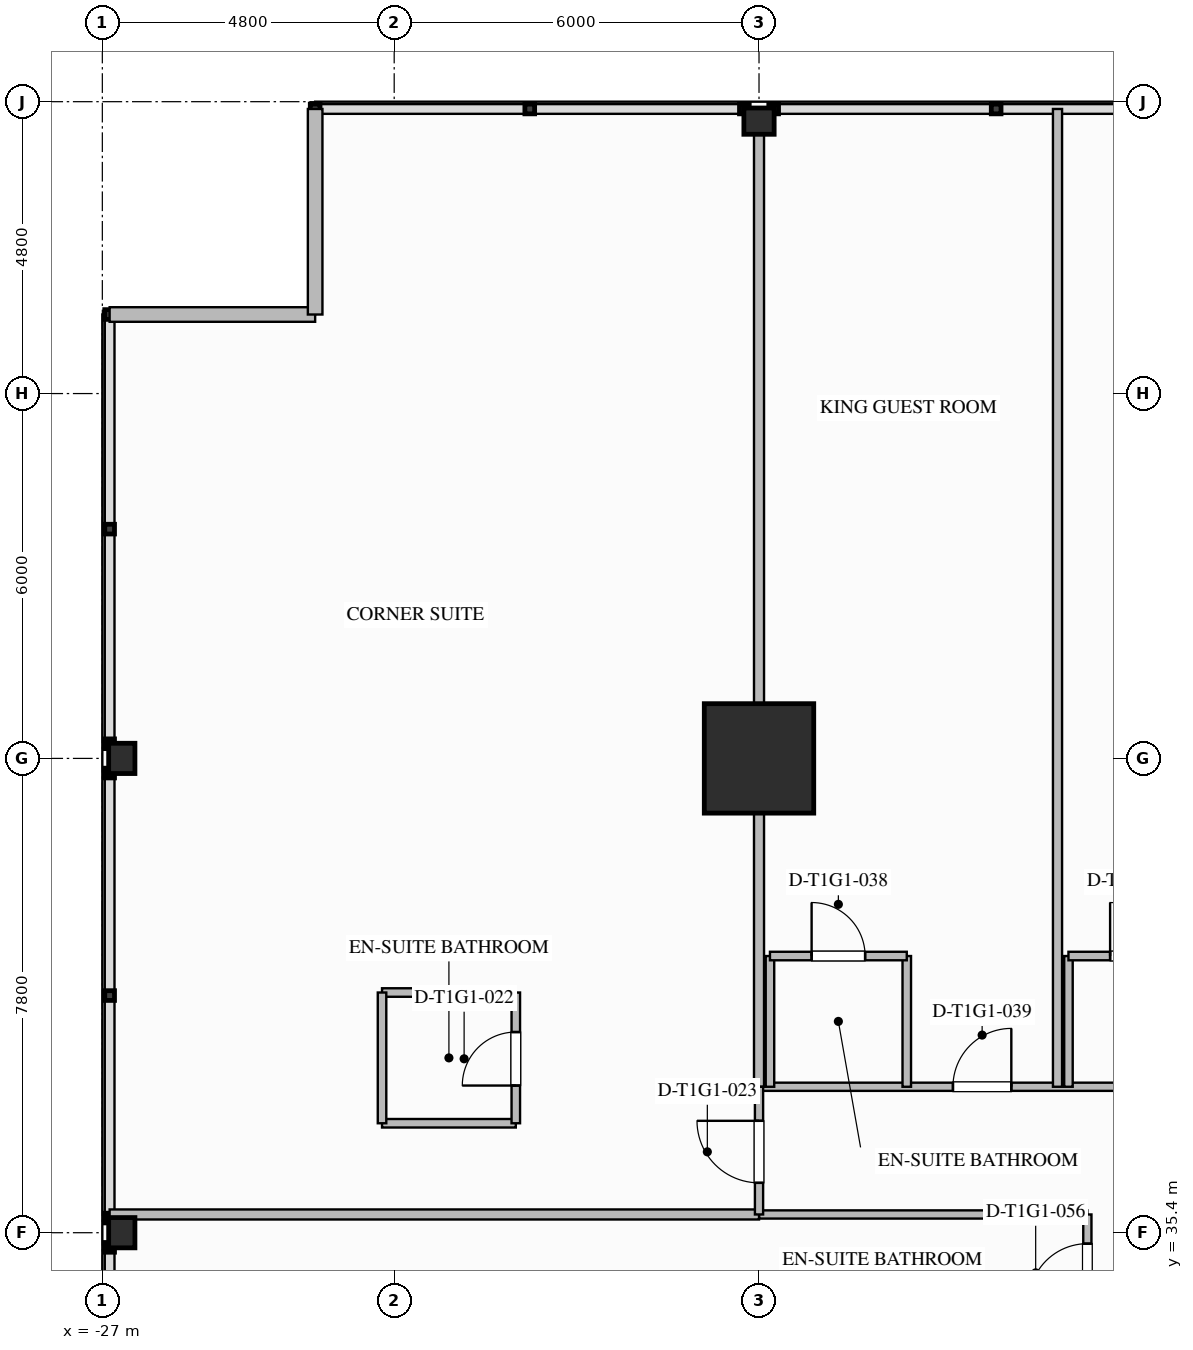
"""IFC4 building model, lengths in metres.
Left out: names, types, materials, properties, quantities, classifications, styles, units other than length and angle.
Written with IfcOpenShell. Run it as: python <this file> out.ifc"""

import sys

from ifc_helpers import new_model, si_unit, direction, frame, frame_2d, origin, origin_2d, place, context, subcontext, project, spatial, rectangle, i_section, extrude, element, fill, save


model = new_model("IFC4")
c1 = context("Model", 3, precision=1e-05, world=origin(), true_north=direction((0.0, 1.0)))
c2 = subcontext(c1, "Body", "Model", "MODEL_VIEW")
j1 = project(units=[si_unit("LENGTHUNIT", "METRE"), si_unit("PLANEANGLEUNIT", "RADIAN")], contexts=[c1])
p1 = place(None, origin())
s1 = spatial("IfcSite", under=j1, at=p1, CompositionType="ELEMENT")
p2 = place(p1, origin())
s2 = spatial("IfcBuilding", under=s1, at=p2, CompositionType="ELEMENT")
p3 = place(p2, frame((0.0, 0.0, 33.2)))
s3 = spatial("IfcBuildingStorey", under=s2, at=p3, CompositionType="ELEMENT", Elevation=33.2)
p4 = place(p3, frame((-16.2, 43.2, 0.0), z_axis=(0.0, 0.0, 1.0), x_axis=(1.0, 0.0, 0.0)))
e1 = element("IfcColumn", 1, at=p4, inside=s3, PredefinedType="COLUMN", context=c2, shape_type="SweptSolid", body=[
    extrude(rectangle(XDim=1.8, YDim=1.8, at=origin_2d()), origin(), (0.0, 0.0, 1.0), 3.5),
])
for number, where, z_axis, x_axis in (
    (2, (-26.68, 35.4, -0.26), (0.0, 0.0, 1.0), (1.0, 0.0, 0.0)),
    (3, (-26.68, 43.2, -0.26), (0.0, 0.0, 1.0), (1.0, 0.0, 0.0)),
    (4, (-16.2, 53.68, -0.26), (0.0, 0.0, 1.0), (0.0, 1.0, 0.0)),
):
    element("IfcColumn", number, at=place(p3, frame(where, z_axis=z_axis, x_axis=x_axis)), inside=s3, PredefinedType="COLUMN", context=c2, shape_type="SweptSolid", body=[
        extrude(i_section(OverallWidth=0.432, OverallDepth=0.498, WebThickness=0.056, FlangeThickness=0.089, FilletRadius=0.03, at=origin_2d()), origin(), (0.0, 0.0, 1.0), 3.757),
    ])
for number, where, z_axis, x_axis in (
    (5, (-26.88, 50.5, 0.0), (0.0, 0.0, 1.0), (1.0, 0.0, 0.0)),
    (6, (-23.5, 50.5, 0.0), (0.0, 0.0, 1.0), (0.0, 1.0, 0.0)),
):
    element("IfcWall", number, at=place(p3, frame(where, z_axis=z_axis, x_axis=x_axis)), inside=s3, PredefinedType="STANDARD", context=c2, shape_type="SweptSolid", body=[
        extrude(rectangle(XDim=3.38, YDim=0.24, at=frame_2d((1.69, 0.0))), origin(), (0.0, 0.0, 1.0), 3.24),
    ])
p5 = place(p3, frame((-16.2, 37.8, 0.0), z_axis=(0.0, 0.0, 1.0), x_axis=(1.0, 0.0, 0.0)))
e7 = element("IfcWall", 7, at=p5, inside=s3, PredefinedType="PARTITIONING", context=c2, shape_type="SweptSolid", body=[
    extrude(rectangle(XDim=32.4, YDim=0.135, at=frame_2d((16.2, 0.0))), origin(), (0.0, 0.0, 1.0), 3.24),
])
p6 = place(p5, frame((3.189, 0.0, 0.0)))
e8 = element("IfcOpeningElement", 8, at=p6, cuts=e7, PredefinedType="OPENING", context=c2, shape_type="SweptSolid", body=[
    extrude(rectangle(XDim=0.96, YDim=2.15, at=frame_2d((0.48, 1.075))), frame((0.0, 0.077, 0.0), z_axis=(0.0, -1.0, 0.0), x_axis=(1.0, 0.0, 0.0)), (0.0, 0.0, 1.0), 0.155),
])
p7 = place(p5, frame((8.229, 0.0, 0.0)))
e9 = element("IfcOpeningElement", 9, at=p7, cuts=e7, PredefinedType="OPENING", context=c2, shape_type="SweptSolid", body=[
    extrude(rectangle(XDim=1.26, YDim=2.2, at=frame_2d((0.63, 1.1))), frame((0.0, 0.077, 0.0), z_axis=(0.0, -1.0, 0.0), x_axis=(1.0, 0.0, 0.0)), (0.0, 0.0, 1.0), 0.155),
])
p8 = place(p5, frame((12.78, 0.0, 0.0)))
e10 = element("IfcOpeningElement", 10, at=p8, cuts=e7, PredefinedType="OPENING", context=c2, shape_type="SweptSolid", body=[
    extrude(rectangle(XDim=1.02, YDim=2.15, at=frame_2d((0.51, 1.075))), frame((0.0, 0.077, 0.0), z_axis=(0.0, -1.0, 0.0), x_axis=(1.0, 0.0, 0.0)), (0.0, 0.0, 1.0), 0.155),
])
p9 = place(p5, frame((19.425, 0.0, 0.0)))
e11 = element("IfcOpeningElement", 11, at=p9, cuts=e7, PredefinedType="OPENING", context=c2, shape_type="SweptSolid", body=[
    extrude(rectangle(XDim=0.96, YDim=2.15, at=frame_2d((0.48, 1.075))), frame((0.0, 0.077, 0.0), z_axis=(0.0, -1.0, 0.0), x_axis=(1.0, 0.0, 0.0)), (0.0, 0.0, 1.0), 0.155),
])
p10 = place(p5, frame((24.92, 0.0, 0.0)))
e12 = element("IfcOpeningElement", 12, at=p10, cuts=e7, PredefinedType="OPENING", context=c2, shape_type="SweptSolid", body=[
    extrude(rectangle(XDim=1.26, YDim=2.2, at=frame_2d((0.63, 1.1))), frame((0.0, 0.077, 0.0), z_axis=(0.0, -1.0, 0.0), x_axis=(1.0, 0.0, 0.0)), (0.0, 0.0, 1.0), 0.155),
])
p11 = place(p5, frame((30.68, 0.0, 0.0)))
e13 = element("IfcOpeningElement", 13, at=p11, cuts=e7, PredefinedType="OPENING", context=c2, shape_type="SweptSolid", body=[
    extrude(rectangle(XDim=0.96, YDim=2.15, at=frame_2d((0.48, 1.075))), frame((0.0, 0.077, 0.0), z_axis=(0.0, -1.0, 0.0), x_axis=(1.0, 0.0, 0.0)), (0.0, 0.0, 1.0), 0.155),
])
p12 = place(p3, frame((-16.2, 35.7, 0.0), z_axis=(0.0, 0.0, 1.0), x_axis=(1.0, 0.0, 0.0)))
e14 = element("IfcWall", 14, at=p12, inside=s3, PredefinedType="PARTITIONING", context=c2, shape_type="SweptSolid", body=[
    extrude(rectangle(XDim=5.4, YDim=0.135, at=frame_2d((2.7, 0.0))), origin(), (0.0, 0.0, 1.0), 3.24),
])
p13 = place(p3, frame((-10.8, 18.3, 0.0), z_axis=(0.0, 0.0, 1.0), x_axis=(0.0, 1.0, 0.0)))
e15 = element("IfcWall", 15, at=p13, inside=s3, PredefinedType="PARTITIONING", context=c2, shape_type="SweptSolid", body=[
    extrude(rectangle(XDim=17.4, YDim=0.135, at=frame_2d((8.7, 0.0))), origin(), (0.0, 0.0, 1.0), 3.24),
])
p14 = place(p13, frame((2.91, 0.0, 0.0)))
e16 = element("IfcOpeningElement", 16, at=p14, cuts=e15, PredefinedType="OPENING", context=c2, shape_type="SweptSolid", body=[
    extrude(rectangle(XDim=0.96, YDim=2.15, at=frame_2d((0.48, 1.075))), frame((0.0, 0.077, 0.0), z_axis=(0.0, -1.0, 0.0), x_axis=(1.0, 0.0, 0.0)), (0.0, 0.0, 1.0), 0.155),
])
p15 = place(p13, frame((7.26, 0.0, 0.0)))
e17 = element("IfcOpeningElement", 17, at=p15, cuts=e15, PredefinedType="OPENING", context=c2, shape_type="SweptSolid", body=[
    extrude(rectangle(XDim=0.96, YDim=2.15, at=frame_2d((0.48, 1.075))), frame((0.0, 0.077, 0.0), z_axis=(0.0, -1.0, 0.0), x_axis=(1.0, 0.0, 0.0)), (0.0, 0.0, 1.0), 0.155),
])
p16 = place(p13, frame((11.61, 0.0, 0.0)))
e18 = element("IfcOpeningElement", 18, at=p16, cuts=e15, PredefinedType="OPENING", context=c2, shape_type="SweptSolid", body=[
    extrude(rectangle(XDim=0.96, YDim=2.15, at=frame_2d((0.48, 1.075))), frame((0.0, 0.077, 0.0), z_axis=(0.0, -1.0, 0.0), x_axis=(1.0, 0.0, 0.0)), (0.0, 0.0, 1.0), 0.155),
])
p17 = place(p13, frame((15.96, 0.0, 0.0)))
e19 = element("IfcOpeningElement", 19, at=p17, cuts=e15, PredefinedType="OPENING", context=c2, shape_type="SweptSolid", body=[
    extrude(rectangle(XDim=0.96, YDim=2.15, at=frame_2d((0.48, 1.075))), frame((0.0, 0.077, 0.0), z_axis=(0.0, -1.0, 0.0), x_axis=(1.0, 0.0, 0.0)), (0.0, 0.0, 1.0), 0.155),
])
p18 = place(p3, frame((-16.2, 37.8, 0.0), z_axis=(0.0, 0.0, 1.0), x_axis=(0.0, 1.0, 0.0)))
e20 = element("IfcWall", 20, at=p18, inside=s3, PredefinedType="PARTITIONING", context=c2, shape_type="SweptSolid", body=[
    extrude(rectangle(XDim=16.08, YDim=0.165, at=frame_2d((8.04, 0.0))), origin(), (0.0, 0.0, 1.0), 2.298),
])
p19 = place(p3, frame((-26.88, 35.7, 0.0), z_axis=(0.0, 0.0, 1.0), x_axis=(1.0, 0.0, 0.0)))
e21 = element("IfcWall", 21, at=p19, inside=s3, PredefinedType="PARTITIONING", context=c2, shape_type="SweptSolid", body=[
    extrude(rectangle(XDim=10.68, YDim=0.165, at=frame_2d((5.34, 0.0))), origin(), (0.0, 0.0, 1.0), 2.298),
])
p20 = place(p3, frame((-16.2, 35.7, 0.0), z_axis=(0.0, 0.0, 1.0), x_axis=(0.0, 1.0, 0.0)))
e22 = element("IfcWall", 22, at=p20, inside=s3, PredefinedType="PARTITIONING", context=c2, shape_type="SweptSolid", body=[
    extrude(rectangle(XDim=2.1, YDim=0.135, at=frame_2d((1.05, 0.0))), origin(), (0.0, 0.0, 1.0), 2.298),
])
p21 = place(p20, frame((0.52, 0.0, 0.0)))
e23 = element("IfcOpeningElement", 23, at=p21, cuts=e22, PredefinedType="OPENING", context=c2, shape_type="SweptSolid", body=[
    extrude(rectangle(XDim=1.02, YDim=2.15, at=frame_2d((0.51, 1.075))), frame((0.0, 0.077, 0.0), z_axis=(0.0, -1.0, 0.0), x_axis=(1.0, 0.0, 0.0)), (0.0, 0.0, 1.0), 0.155),
])
for number, where, z_axis, x_axis in (
    (24, (-22.4, 37.2, 0.0), (0.0, 0.0, 1.0), (1.0, 0.0, 0.0)),
    (25, (-22.4, 39.35, 0.0), (0.0, 0.0, 1.0), (1.0, 0.0, 0.0)),
):
    element("IfcWall", number, at=place(p3, frame(where, z_axis=z_axis, x_axis=x_axis)), inside=s3, PredefinedType="PLUMBINGWALL", context=c2, shape_type="SweptSolid", body=[
        extrude(rectangle(XDim=2.2, YDim=0.14, at=frame_2d((1.1, 0.0))), origin(), (0.0, 0.0, 1.0), 3.24),
    ])
p22 = place(p3, frame((-22.4, 37.2, 0.0), z_axis=(0.0, 0.0, 1.0), x_axis=(0.0, 1.0, 0.0)))
e26 = element("IfcWall", 26, at=p22, inside=s3, PredefinedType="PLUMBINGWALL", context=c2, shape_type="SweptSolid", body=[
    extrude(rectangle(XDim=2.15, YDim=0.14, at=frame_2d((1.075, 0.0))), origin(), (0.0, 0.0, 1.0), 3.24),
])
p23 = place(p3, frame((-20.2, 37.2, 0.0), z_axis=(0.0, 0.0, 1.0), x_axis=(0.0, 1.0, 0.0)))
e27 = element("IfcWall", 27, at=p23, inside=s3, PredefinedType="PLUMBINGWALL", context=c2, shape_type="SweptSolid", body=[
    extrude(rectangle(XDim=2.15, YDim=0.14, at=frame_2d((1.075, 0.0))), origin(), (0.0, 0.0, 1.0), 3.24),
])
p24 = place(p23, frame((0.62, 0.0, 0.0)))
e28 = element("IfcOpeningElement", 28, at=p24, cuts=e27, PredefinedType="OPENING", context=c2, shape_type="SweptSolid", body=[
    extrude(rectangle(XDim=0.88, YDim=2.1, at=frame_2d((0.44, 1.05))), frame((0.0, 0.08, 0.0), z_axis=(0.0, -1.0, 0.0), x_axis=(1.0, 0.0, 0.0)), (0.0, 0.0, 1.0), 0.16),
])
p25 = place(p3, frame((-16.02, 37.8, 0.0), z_axis=(0.0, 0.0, 1.0), x_axis=(0.0, 1.0, 0.0)))
e29 = element("IfcWall", 29, at=p25, inside=s3, PredefinedType="PLUMBINGWALL", context=c2, shape_type="SweptSolid", body=[
    extrude(rectangle(XDim=2.15, YDim=0.14, at=frame_2d((1.075, 0.0))), origin(), (0.0, 0.0, 1.0), 2.298),
])
p26 = place(p3, frame((-13.77, 37.8, 0.0), z_axis=(0.0, 0.0, 1.0), x_axis=(0.0, 1.0, 0.0)))
e30 = element("IfcWall", 30, at=p26, inside=s3, PredefinedType="PLUMBINGWALL", context=c2, shape_type="SweptSolid", body=[
    extrude(rectangle(XDim=2.15, YDim=0.14, at=frame_2d((1.075, 0.0))), origin(), (0.0, 0.0, 1.0), 3.24),
])
p27 = place(p3, frame((-16.02, 39.95, 0.0), z_axis=(0.0, 0.0, 1.0), x_axis=(1.0, 0.0, 0.0)))
e31 = element("IfcWall", 31, at=p27, inside=s3, PredefinedType="PLUMBINGWALL", context=c2, shape_type="SweptSolid", body=[
    extrude(rectangle(XDim=2.25, YDim=0.14, at=frame_2d((1.125, 0.0))), origin(), (0.0, 0.0, 1.0), 3.24),
])
p28 = place(p27, frame((0.685, 0.0, 0.0)))
e32 = element("IfcOpeningElement", 32, at=p28, cuts=e31, PredefinedType="OPENING", context=c2, shape_type="SweptSolid", body=[
    extrude(rectangle(XDim=0.88, YDim=2.1, at=frame_2d((0.44, 1.05))), frame((0.0, 0.08, 0.0), z_axis=(0.0, -1.0, 0.0), x_axis=(1.0, 0.0, 0.0)), (0.0, 0.0, 1.0), 0.16),
])
p29 = place(p3, frame((-11.291, 37.8, 0.0), z_axis=(0.0, 0.0, 1.0), x_axis=(0.0, 1.0, 0.0)))
e33 = element("IfcWall", 33, at=p29, inside=s3, PredefinedType="PARTITIONING", context=c2, shape_type="SweptSolid", body=[
    extrude(rectangle(XDim=16.08, YDim=0.15, at=frame_2d((8.04, 0.0))), origin(), (0.0, 0.0, 1.0), 3.24),
])
p30 = place(p3, frame((-11.111, 37.8, 0.0), z_axis=(0.0, 0.0, 1.0), x_axis=(0.0, 1.0, 0.0)))
e34 = element("IfcWall", 34, at=p30, inside=s3, PredefinedType="PLUMBINGWALL", context=c2, shape_type="SweptSolid", body=[
    extrude(rectangle(XDim=2.15, YDim=0.14, at=frame_2d((1.075, 0.0))), origin(), (0.0, 0.0, 1.0), 3.24),
])
p31 = place(p3, frame((-11.111, 39.95, 0.0), z_axis=(0.0, 0.0, 1.0), x_axis=(1.0, 0.0, 0.0)))
e35 = element("IfcWall", 35, at=p31, inside=s3, PredefinedType="PLUMBINGWALL", context=c2, shape_type="SweptSolid", body=[
    extrude(rectangle(XDim=2.25, YDim=0.14, at=frame_2d((1.125, 0.0))), origin(), (0.0, 0.0, 1.0), 3.24),
])
p32 = place(p31, frame((0.685, 0.0, 0.0)))
e36 = element("IfcOpeningElement", 36, at=p32, cuts=e35, PredefinedType="OPENING", context=c2, shape_type="SweptSolid", body=[
    extrude(rectangle(XDim=0.88, YDim=2.1, at=frame_2d((0.44, 1.05))), frame((0.0, 0.08, 0.0), z_axis=(0.0, -1.0, 0.0), x_axis=(1.0, 0.0, 0.0)), (0.0, 0.0, 1.0), 0.16),
])
p33 = place(p24, origin())
e37 = element("IfcDoor", 37, at=p33, inside=s3, OperationType="SINGLE_SWING_LEFT", PredefinedType="DOOR", context=c2, shape_type="SweptSolid", body=[
    extrude(rectangle(XDim=0.88, YDim=2.1, at=frame_2d((0.44, 1.05))), frame((0.0, 0.025, 0.0), z_axis=(0.0, -1.0, 0.0), x_axis=(1.0, 0.0, 0.0)), (0.0, 0.0, 1.0), 0.05),
])
fill(e28, e37)
p34 = place(p21, origin())
e38 = element("IfcDoor", 38, at=p34, inside=s3, OperationType="SINGLE_SWING_RIGHT", PredefinedType="DOOR", context=c2, shape_type="SweptSolid", body=[
    extrude(rectangle(XDim=1.02, YDim=2.15, at=frame_2d((0.51, 1.075))), frame((0.0, 0.025, 0.0), z_axis=(0.0, -1.0, 0.0), x_axis=(1.0, 0.0, 0.0)), (0.0, 0.0, 1.0), 0.05),
])
fill(e23, e38)
p35 = place(p28, origin())
e39 = element("IfcDoor", 39, at=p35, inside=s3, OperationType="SINGLE_SWING_LEFT", PredefinedType="DOOR", context=c2, shape_type="SweptSolid", body=[
    extrude(rectangle(XDim=0.88, YDim=2.1, at=frame_2d((0.44, 1.05))), frame((0.0, 0.025, 0.0), z_axis=(0.0, -1.0, 0.0), x_axis=(1.0, 0.0, 0.0)), (0.0, 0.0, 1.0), 0.05),
])
fill(e32, e39)
p36 = place(p6, origin())
e40 = element("IfcDoor", 40, at=p36, inside=s3, OperationType="SINGLE_SWING_RIGHT", PredefinedType="DOOR", context=c2, shape_type="SweptSolid", body=[
    extrude(rectangle(XDim=0.96, YDim=2.15, at=frame_2d((0.48, 1.075))), frame((0.0, 0.025, 0.0), z_axis=(0.0, -1.0, 0.0), x_axis=(1.0, 0.0, 0.0)), (0.0, 0.0, 1.0), 0.05),
])
fill(e8, e40)
p37 = place(p32, origin())
e41 = element("IfcDoor", 41, at=p37, inside=s3, OperationType="SINGLE_SWING_LEFT", PredefinedType="DOOR", context=c2, shape_type="SweptSolid", body=[
    extrude(rectangle(XDim=0.88, YDim=2.1, at=frame_2d((0.44, 1.05))), frame((0.0, 0.025, 0.0), z_axis=(0.0, -1.0, 0.0), x_axis=(1.0, 0.0, 0.0)), (0.0, 0.0, 1.0), 0.05),
])
fill(e36, e41)
p38 = place(p17, origin())
e42 = element("IfcDoor", 42, at=p38, inside=s3, OperationType="SINGLE_SWING_LEFT", PredefinedType="DOOR", context=c2, shape_type="SweptSolid", body=[
    extrude(rectangle(XDim=0.96, YDim=2.15, at=frame_2d((0.48, 1.075))), frame((0.0, 0.025, 0.0), z_axis=(0.0, -1.0, 0.0), x_axis=(1.0, 0.0, 0.0)), (0.0, 0.0, 1.0), 0.05),
])
fill(e19, e42)
save(model, sys.argv[1])
